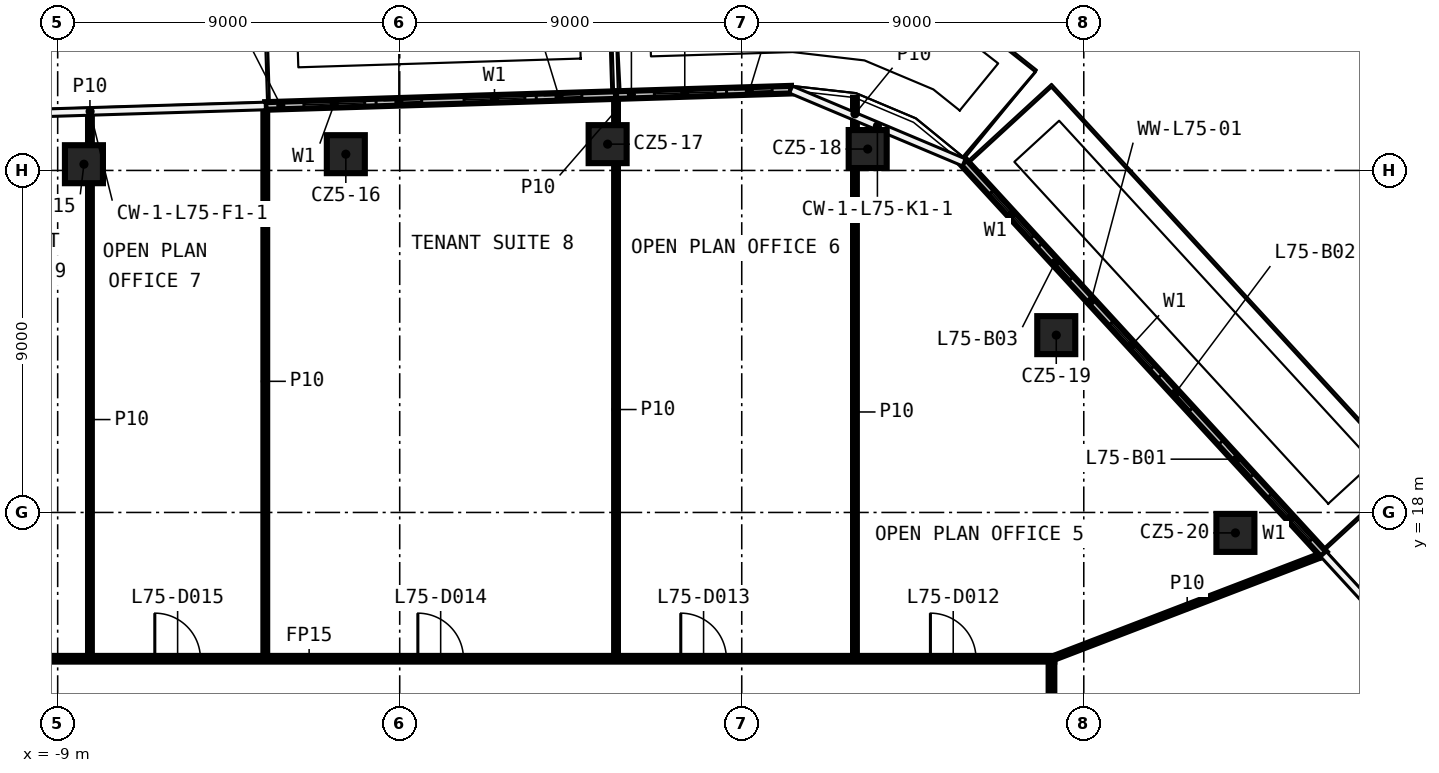
"""IFC4 building model, lengths in metres.
Left out: names, types, materials, properties, quantities, classifications, styles, units other than length and angle.
Written with IfcOpenShell. Run it as: python <this file> out.ifc"""

import sys

from ifc_helpers import new_model, si_unit, direction, frame, frame_2d, origin, origin_2d, place, context, subcontext, project, spatial, rectangle, extrude, element, fill, save


model = new_model("IFC4")
c1 = context("Model", 3, precision=1e-05, world=origin(), true_north=direction((0.0, 1.0)))
c2 = subcontext(c1, "Body", "Model", "MODEL_VIEW")
j1 = project(units=[si_unit("LENGTHUNIT", "METRE"), si_unit("PLANEANGLEUNIT", "RADIAN")], contexts=[c1])
p1 = place(None, origin())
s1 = spatial("IfcSite", under=j1, at=p1, CompositionType="ELEMENT")
p2 = place(p1, origin())
s2 = spatial("IfcBuilding", under=s1, at=p2, CompositionType="ELEMENT")
p3 = place(p2, frame((0.0, 0.0, 348.8)))
s3 = spatial("IfcBuildingStorey", under=s2, at=p3, CompositionType="ELEMENT", Elevation=348.8)
for number, where, z_axis, x_axis in (
    (1, (-8.309, 27.164, 0.0), (0.0, 0.0, 1.0), (1.0, 0.0, 0.0)),
    (2, (-1.418, 27.428, 0.0), (0.0, 0.0, 1.0), (1.0, 0.0, 0.0)),
    (3, (5.471, 27.692, 0.0), (0.0, 0.0, 1.0), (1.0, 0.0, 0.0)),
    (4, (12.314, 27.563, 0.0), (0.0, 0.0, 1.0), (1.0, 0.0, 0.0)),
    (5, (17.276, 22.666, 0.0), (0.0, 0.0, 1.0), (1.0, 0.0, 0.0)),
    (6, (21.99, 17.462, 0.0), (0.0, 0.0, 1.0), (1.0, 0.0, 0.0)),
):
    element("IfcColumn", number, at=place(p3, frame(where, z_axis=z_axis, x_axis=x_axis)), inside=s3, PredefinedType="COLUMN", context=c2, shape_type="SweptSolid", body=[
        extrude(rectangle(XDim=1.0, YDim=1.0, at=origin_2d()), origin(), (0.0, 0.0, 1.0), 3.7),
    ])
p4 = place(p3, frame((-17.225, 14.15, 0.0), z_axis=(0.0, 0.0, 1.0), x_axis=(1.0, 0.0, 0.0)))
e7 = element("IfcWall", 7, at=p4, inside=s3, PredefinedType="PARTITIONING", context=c2, shape_type="SweptSolid", body=[
    extrude(rectangle(XDim=34.45, YDim=0.15, at=frame_2d((17.225, 0.0))), origin(), (0.0, 0.0, 1.0), 3.7),
])
p5 = place(p4, frame((31.19, 0.0, 0.0)))
e8 = element("IfcOpeningElement", 8, at=p5, cuts=e7, PredefinedType="OPENING", context=c2, shape_type="SweptSolid", body=[
    extrude(rectangle(XDim=1.2, YDim=2.1, at=frame_2d((0.6, 1.05))), frame((0.0, 0.085, 0.0), z_axis=(0.0, -1.0, 0.0), x_axis=(1.0, 0.0, 0.0)), (0.0, 0.0, 1.0), 0.17),
])
p6 = place(p4, frame((24.621, 0.0, 0.0)))
e9 = element("IfcOpeningElement", 9, at=p6, cuts=e7, PredefinedType="OPENING", context=c2, shape_type="SweptSolid", body=[
    extrude(rectangle(XDim=1.2, YDim=2.1, at=frame_2d((0.6, 1.05))), frame((0.0, 0.085, 0.0), z_axis=(0.0, -1.0, 0.0), x_axis=(1.0, 0.0, 0.0)), (0.0, 0.0, 1.0), 0.17),
])
p7 = place(p4, frame((17.703, 0.0, 0.0)))
e10 = element("IfcOpeningElement", 10, at=p7, cuts=e7, PredefinedType="OPENING", context=c2, shape_type="SweptSolid", body=[
    extrude(rectangle(XDim=1.2, YDim=2.1, at=frame_2d((0.6, 1.05))), frame((0.0, 0.085, 0.0), z_axis=(0.0, -1.0, 0.0), x_axis=(1.0, 0.0, 0.0)), (0.0, 0.0, 1.0), 0.17),
])
p8 = place(p4, frame((10.781, 0.0, 0.0)))
e11 = element("IfcOpeningElement", 11, at=p8, cuts=e7, PredefinedType="OPENING", context=c2, shape_type="SweptSolid", body=[
    extrude(rectangle(XDim=1.2, YDim=2.1, at=frame_2d((0.6, 1.05))), frame((0.0, 0.085, 0.0), z_axis=(0.0, -1.0, 0.0), x_axis=(1.0, 0.0, 0.0)), (0.0, 0.0, 1.0), 0.17),
])
p9 = place(p4, frame((6.171, 0.0, 0.0)))
e12 = element("IfcOpeningElement", 12, at=p9, cuts=e7, PredefinedType="OPENING", context=c2, shape_type="SweptSolid", body=[
    extrude(rectangle(XDim=1.2, YDim=2.1, at=frame_2d((0.6, 1.05))), frame((0.0, 0.085, 0.0), z_axis=(0.0, -1.0, 0.0), x_axis=(1.0, 0.0, 0.0)), (0.0, 0.0, 1.0), 0.17),
])
p10 = place(p4, frame((1.932, 0.0, 0.0)))
e13 = element("IfcOpeningElement", 13, at=p10, cuts=e7, PredefinedType="OPENING", context=c2, shape_type="SweptSolid", body=[
    extrude(rectangle(XDim=1.2, YDim=2.1, at=frame_2d((0.6, 1.05))), frame((0.0, 0.085, 0.0), z_axis=(0.0, -1.0, 0.0), x_axis=(1.0, 0.0, 0.0)), (0.0, 0.0, 1.0), 0.17),
])
p11 = place(p3, frame((17.15, 14.15, 0.0), z_axis=(0.0, 0.0, 1.0), x_axis=(0.933641376905, 0.358209127927, 0.0)))
e14 = element("IfcWall", 14, at=p11, inside=s3, PredefinedType="PARTITIONING", context=c2, shape_type="SweptSolid", body=[
    extrude(rectangle(XDim=7.65, YDim=0.1, at=frame_2d((3.825, 0.0))), origin(), (0.0, 0.0, 1.0), 3.7),
])
p12 = place(p3, frame((17.15, 14.075, 0.0), z_axis=(0.0, 0.0, 1.0), x_axis=(0.0, -1.0, 0.0)))
e15 = element("IfcWall", 15, at=p12, inside=s3, PredefinedType="PARTITIONING", context=c2, shape_type="SweptSolid", body=[
    extrude(rectangle(XDim=28.15, YDim=0.15, at=frame_2d((14.075, 0.0))), origin(), (0.0, 0.0, 1.0), 3.7),
])
p13 = place(p12, frame((24.292, 0.0, 0.0)))
e16 = element("IfcOpeningElement", 16, at=p13, cuts=e15, PredefinedType="OPENING", context=c2, shape_type="SweptSolid", body=[
    extrude(rectangle(XDim=1.2, YDim=2.1, at=frame_2d((0.6, 1.05))), frame((0.0, 0.085, 0.0), z_axis=(0.0, -1.0, 0.0), x_axis=(1.0, 0.0, 0.0)), (0.0, 0.0, 1.0), 0.17),
])
p14 = place(p12, frame((10.898, 0.0, 0.0)))
e17 = element("IfcOpeningElement", 17, at=p14, cuts=e15, PredefinedType="OPENING", context=c2, shape_type="SweptSolid", body=[
    extrude(rectangle(XDim=1.2, YDim=2.1, at=frame_2d((0.6, 1.05))), frame((0.0, 0.085, 0.0), z_axis=(0.0, -1.0, 0.0), x_axis=(1.0, 0.0, 0.0)), (0.0, 0.0, 1.0), 0.17),
])
p15 = place(p12, frame((3.873, 0.0, 0.0)))
e18 = element("IfcOpeningElement", 18, at=p15, cuts=e15, PredefinedType="OPENING", context=c2, shape_type="SweptSolid", body=[
    extrude(rectangle(XDim=1.2, YDim=2.1, at=frame_2d((0.6, 1.05))), frame((0.0, 0.085, 0.0), z_axis=(0.0, -1.0, 0.0), x_axis=(1.0, 0.0, 0.0)), (0.0, 0.0, 1.0), 0.17),
])
p16 = place(p3, frame((11.979, 14.225, 0.0), z_axis=(0.0, 0.0, 1.0), x_axis=(0.0, 1.0, 0.0)))
e19 = element("IfcWall", 19, at=p16, inside=s3, PredefinedType="PARTITIONING", context=c2, shape_type="SweptSolid", body=[
    extrude(rectangle(XDim=12.838, YDim=0.1, at=frame_2d((6.419, 0.0))), origin(), (0.0, 0.0, 1.0), 3.7),
])
p17 = place(p3, frame((11.979, 28.063, 0.0), z_axis=(0.0, 0.0, 1.0), x_axis=(0.0, 1.0, 0.0)))
e20 = element("IfcWall", 20, at=p17, inside=s3, PredefinedType="PARTITIONING", context=c2, shape_type="SweptSolid", body=[
    extrude(rectangle(XDim=0.852, YDim=0.1, at=frame_2d((0.426, 0.0))), origin(), (0.0, 0.0, 1.0), 3.7),
])
p18 = place(p3, frame((5.692, 14.225, 0.0), z_axis=(0.0, 0.0, 1.0), x_axis=(0.0, 1.0, 0.0)))
e21 = element("IfcWall", 21, at=p18, inside=s3, PredefinedType="PARTITIONING", context=c2, shape_type="SweptSolid", body=[
    extrude(rectangle(XDim=12.967, YDim=0.1, at=frame_2d((6.483, 0.0))), origin(), (0.0, 0.0, 1.0), 3.7),
])
p19 = place(p3, frame((5.692, 28.192, 0.0), z_axis=(0.0, 0.0, 1.0), x_axis=(0.0, 1.0, 0.0)))
e22 = element("IfcWall", 22, at=p19, inside=s3, PredefinedType="PARTITIONING", context=c2, shape_type="SweptSolid", body=[
    extrude(rectangle(XDim=0.771, YDim=0.1, at=frame_2d((0.385, 0.0))), origin(), (0.0, 0.0, 1.0), 3.7),
])
p20 = place(p3, frame((-3.537, 14.225, 0.0), z_axis=(0.0, 0.0, 1.0), x_axis=(0.0, 1.0, 0.0)))
e23 = element("IfcWall", 23, at=p20, inside=s3, PredefinedType="PARTITIONING", context=c2, shape_type="SweptSolid", body=[
    extrude(rectangle(XDim=14.451, YDim=0.1, at=frame_2d((7.226, 0.0))), origin(), (0.0, 0.0, 1.0), 3.7),
])
p21 = place(p3, frame((-8.151, 14.225, 0.0), z_axis=(0.0, 0.0, 1.0), x_axis=(0.0, 1.0, 0.0)))
e24 = element("IfcWall", 24, at=p21, inside=s3, PredefinedType="PARTITIONING", context=c2, shape_type="SweptSolid", body=[
    extrude(rectangle(XDim=12.439, YDim=0.1, at=frame_2d((6.219, 0.0))), origin(), (0.0, 0.0, 1.0), 3.7),
])
p22 = place(p3, frame((-8.151, 27.664, 0.0), z_axis=(0.0, 0.0, 1.0), x_axis=(0.0, 1.0, 0.0)))
e25 = element("IfcWall", 25, at=p22, inside=s3, PredefinedType="PARTITIONING", context=c2, shape_type="SweptSolid", body=[
    extrude(rectangle(XDim=0.869, YDim=0.1, at=frame_2d((0.435, 0.0))), origin(), (0.0, 0.0, 1.0), 3.7),
])
p23 = place(p3, frame((24.313, 16.898, 0.0), z_axis=(0.0, 0.0, 1.0), x_axis=(-0.676360611012, 0.736570650971, 0.0)))
e26 = element("IfcWall", 26, at=p23, inside=s3, PredefinedType="SOLIDWALL", context=c2, shape_type="SweptSolid", body=[
    extrude(rectangle(XDim=14.005, YDim=0.2, at=frame_2d((7.003, 0.0))), origin(), (0.0, 0.0, 1.0), 3.7),
])
p24 = place(p23, frame((0.5, 0.0, 0.6)))
e27 = element("IfcOpeningElement", 27, at=p24, cuts=e26, PredefinedType="OPENING", context=c2, shape_type="SweptSolid", body=[
    extrude(rectangle(XDim=1.6, YDim=2.4, at=frame_2d((0.8, 1.2))), frame((0.0, 0.11, 0.0), z_axis=(0.0, -1.0, 0.0), x_axis=(1.0, 0.0, 0.0)), (0.0, 0.0, 1.0), 0.22),
])
p25 = place(p23, frame((2.8, 0.0, 0.0)))
e28 = element("IfcOpeningElement", 28, at=p25, cuts=e26, PredefinedType="OPENING", context=c2, shape_type="SweptSolid", body=[
    extrude(rectangle(XDim=1.2, YDim=2.4, at=frame_2d((0.6, 1.2))), frame((0.0, 0.11, 0.0), z_axis=(0.0, -1.0, 0.0), x_axis=(1.0, 0.0, 0.0)), (0.0, 0.0, 1.0), 0.22),
])
p26 = place(p23, frame((6.668, 0.0, 0.6)))
e29 = element("IfcOpeningElement", 29, at=p26, cuts=e26, PredefinedType="OPENING", context=c2, shape_type="SweptSolid", body=[
    extrude(rectangle(XDim=1.6, YDim=2.4, at=frame_2d((0.8, 1.2))), frame((0.0, 0.11, 0.0), z_axis=(0.0, -1.0, 0.0), x_axis=(1.0, 0.0, 0.0)), (0.0, 0.0, 1.0), 0.22),
])
p27 = place(p23, frame((5.168, 0.0, 0.0)))
e30 = element("IfcOpeningElement", 30, at=p27, cuts=e26, PredefinedType="OPENING", context=c2, shape_type="SweptSolid", body=[
    extrude(rectangle(XDim=1.2, YDim=2.4, at=frame_2d((0.6, 1.2))), frame((0.0, 0.11, 0.0), z_axis=(0.0, -1.0, 0.0), x_axis=(1.0, 0.0, 0.0)), (0.0, 0.0, 1.0), 0.22),
])
p28 = place(p23, frame((11.337, 0.0, 0.6)))
e31 = element("IfcOpeningElement", 31, at=p28, cuts=e26, PredefinedType="OPENING", context=c2, shape_type="SweptSolid", body=[
    extrude(rectangle(XDim=1.6, YDim=2.4, at=frame_2d((0.8, 1.2))), frame((0.0, 0.11, 0.0), z_axis=(0.0, -1.0, 0.0), x_axis=(1.0, 0.0, 0.0)), (0.0, 0.0, 1.0), 0.22),
])
p29 = place(p23, frame((9.837, 0.0, 0.0)))
e32 = element("IfcOpeningElement", 32, at=p29, cuts=e26, PredefinedType="OPENING", context=c2, shape_type="SweptSolid", body=[
    extrude(rectangle(XDim=1.2, YDim=2.4, at=frame_2d((0.6, 1.2))), frame((0.0, 0.11, 0.0), z_axis=(0.0, -1.0, 0.0), x_axis=(1.0, 0.0, 0.0)), (0.0, 0.0, 1.0), 0.22),
])
p30 = place(p3, frame((5.692, 28.983, 0.0), z_axis=(0.0, 0.0, 1.0), x_axis=(-0.999518913705, -0.031015176069, 0.0)))
e33 = element("IfcWall", 33, at=p30, inside=s3, PredefinedType="SOLIDWALL", context=c2, shape_type="SweptSolid", body=[
    extrude(rectangle(XDim=9.233, YDim=0.2, at=frame_2d((4.617, 0.0))), origin(), (0.0, 0.0, 1.0), 3.7),
])
p31 = place(p30, frame((2.4, 0.0, 0.6)))
e34 = element("IfcOpeningElement", 34, at=p31, cuts=e33, PredefinedType="OPENING", context=c2, shape_type="SweptSolid", body=[
    extrude(rectangle(XDim=1.6, YDim=2.4, at=frame_2d((0.8, 1.2))), frame((0.0, 0.11, 0.0), z_axis=(0.0, -1.0, 0.0), x_axis=(1.0, 0.0, 0.0)), (0.0, 0.0, 1.0), 0.22),
])
p32 = place(p30, frame((0.9, 0.0, 0.0)))
e35 = element("IfcOpeningElement", 35, at=p32, cuts=e33, PredefinedType="OPENING", context=c2, shape_type="SweptSolid", body=[
    extrude(rectangle(XDim=1.2, YDim=2.4, at=frame_2d((0.6, 1.2))), frame((0.0, 0.11, 0.0), z_axis=(0.0, -1.0, 0.0), x_axis=(1.0, 0.0, 0.0)), (0.0, 0.0, 1.0), 0.22),
])
p33 = place(p30, frame((6.617, 0.0, 0.6)))
e36 = element("IfcOpeningElement", 36, at=p33, cuts=e33, PredefinedType="OPENING", context=c2, shape_type="SweptSolid", body=[
    extrude(rectangle(XDim=1.6, YDim=2.4, at=frame_2d((0.8, 1.2))), frame((0.0, 0.11, 0.0), z_axis=(0.0, -1.0, 0.0), x_axis=(1.0, 0.0, 0.0)), (0.0, 0.0, 1.0), 0.22),
])
p34 = place(p30, frame((5.117, 0.0, 0.0)))
e37 = element("IfcOpeningElement", 37, at=p34, cuts=e33, PredefinedType="OPENING", context=c2, shape_type="SweptSolid", body=[
    extrude(rectangle(XDim=1.2, YDim=2.4, at=frame_2d((0.6, 1.2))), frame((0.0, 0.11, 0.0), z_axis=(0.0, -1.0, 0.0), x_axis=(1.0, 0.0, 0.0)), (0.0, 0.0, 1.0), 0.22),
])
p35 = place(p3, frame((10.299, 29.126, 0.0), z_axis=(0.0, 0.0, 1.0), x_axis=(-0.999519847684, -0.030985062312, 0.0)))
e38 = element("IfcWall", 38, at=p35, inside=s3, PredefinedType="SOLIDWALL", context=c2, shape_type="SweptSolid", body=[
    extrude(rectangle(XDim=4.609, YDim=0.2, at=frame_2d((2.305, 0.0))), origin(), (0.0, 0.0, 1.0), 3.7),
])
p36 = place(p35, frame((2.0, 0.0, 0.6)))
e39 = element("IfcOpeningElement", 39, at=p36, cuts=e38, PredefinedType="OPENING", context=c2, shape_type="SweptSolid", body=[
    extrude(rectangle(XDim=1.6, YDim=2.4, at=frame_2d((0.8, 1.2))), frame((0.0, 0.11, 0.0), z_axis=(0.0, -1.0, 0.0), x_axis=(1.0, 0.0, 0.0)), (0.0, 0.0, 1.0), 0.22),
])
p37 = place(p35, frame((0.5, 0.0, 0.0)))
e40 = element("IfcOpeningElement", 40, at=p37, cuts=e38, PredefinedType="OPENING", context=c2, shape_type="SweptSolid", body=[
    extrude(rectangle(XDim=1.2, YDim=2.4, at=frame_2d((0.6, 1.2))), frame((0.0, 0.11, 0.0), z_axis=(0.0, -1.0, 0.0), x_axis=(1.0, 0.0, 0.0)), (0.0, 0.0, 1.0), 0.22),
])
p38 = place(p5, origin())
e41 = element("IfcDoor", 41, at=p38, inside=s3, OperationType="SINGLE_SWING_LEFT", PredefinedType="DOOR", context=c2, shape_type="SweptSolid", body=[
    extrude(rectangle(XDim=1.2, YDim=2.1, at=frame_2d((0.6, 1.05))), frame((0.0, 0.025, 0.0), z_axis=(0.0, -1.0, 0.0), x_axis=(1.0, 0.0, 0.0)), (0.0, 0.0, 1.0), 0.05),
])
fill(e8, e41)
p39 = place(p6, origin())
e42 = element("IfcDoor", 42, at=p39, inside=s3, OperationType="SINGLE_SWING_RIGHT", PredefinedType="DOOR", context=c2, shape_type="SweptSolid", body=[
    extrude(rectangle(XDim=1.2, YDim=2.1, at=frame_2d((0.6, 1.05))), frame((0.0, 0.025, 0.0), z_axis=(0.0, -1.0, 0.0), x_axis=(1.0, 0.0, 0.0)), (0.0, 0.0, 1.0), 0.05),
])
fill(e9, e42)
p40 = place(p7, origin())
e43 = element("IfcDoor", 43, at=p40, inside=s3, OperationType="SINGLE_SWING_LEFT", PredefinedType="DOOR", context=c2, shape_type="SweptSolid", body=[
    extrude(rectangle(XDim=1.2, YDim=2.1, at=frame_2d((0.6, 1.05))), frame((0.0, 0.025, 0.0), z_axis=(0.0, -1.0, 0.0), x_axis=(1.0, 0.0, 0.0)), (0.0, 0.0, 1.0), 0.05),
])
fill(e10, e43)
p41 = place(p8, origin())
e44 = element("IfcDoor", 44, at=p41, inside=s3, OperationType="SINGLE_SWING_RIGHT", PredefinedType="DOOR", context=c2, shape_type="SweptSolid", body=[
    extrude(rectangle(XDim=1.2, YDim=2.1, at=frame_2d((0.6, 1.05))), frame((0.0, 0.025, 0.0), z_axis=(0.0, -1.0, 0.0), x_axis=(1.0, 0.0, 0.0)), (0.0, 0.0, 1.0), 0.05),
])
fill(e11, e44)
p42 = place(p24, origin())
e45 = element("IfcWindow", 45, at=p42, inside=s3, PartitioningType="SINGLE_PANEL", PredefinedType="WINDOW", context=c2, shape_type="SweptSolid", body=[
    extrude(rectangle(XDim=1.6, YDim=2.4, at=frame_2d((0.8, 1.2))), frame((0.0, 0.03, 0.0), z_axis=(0.0, -1.0, 0.0), x_axis=(1.0, 0.0, 0.0)), (0.0, 0.0, 1.0), 0.06),
])
fill(e27, e45)
p43 = place(p25, origin())
e46 = element("IfcDoor", 46, at=p43, inside=s3, OperationType="SLIDING_TO_LEFT", PredefinedType="DOOR", context=c2, shape_type="SweptSolid", body=[
    extrude(rectangle(XDim=1.2, YDim=2.4, at=frame_2d((0.6, 1.2))), frame((0.0, 0.025, 0.0), z_axis=(0.0, -1.0, 0.0), x_axis=(1.0, 0.0, 0.0)), (0.0, 0.0, 1.0), 0.05),
])
fill(e28, e46)
p44 = place(p26, origin())
e47 = element("IfcWindow", 47, at=p44, inside=s3, PartitioningType="SINGLE_PANEL", PredefinedType="WINDOW", context=c2, shape_type="SweptSolid", body=[
    extrude(rectangle(XDim=1.6, YDim=2.4, at=frame_2d((0.8, 1.2))), frame((0.0, 0.03, 0.0), z_axis=(0.0, -1.0, 0.0), x_axis=(1.0, 0.0, 0.0)), (0.0, 0.0, 1.0), 0.06),
])
fill(e29, e47)
p45 = place(p27, origin())
e48 = element("IfcDoor", 48, at=p45, inside=s3, OperationType="SLIDING_TO_LEFT", PredefinedType="DOOR", context=c2, shape_type="SweptSolid", body=[
    extrude(rectangle(XDim=1.2, YDim=2.4, at=frame_2d((0.6, 1.2))), frame((0.0, 0.025, 0.0), z_axis=(0.0, -1.0, 0.0), x_axis=(1.0, 0.0, 0.0)), (0.0, 0.0, 1.0), 0.05),
])
fill(e30, e48)
p46 = place(p28, origin())
e49 = element("IfcWindow", 49, at=p46, inside=s3, PartitioningType="SINGLE_PANEL", PredefinedType="WINDOW", context=c2, shape_type="SweptSolid", body=[
    extrude(rectangle(XDim=1.6, YDim=2.4, at=frame_2d((0.8, 1.2))), frame((0.0, 0.03, 0.0), z_axis=(0.0, -1.0, 0.0), x_axis=(1.0, 0.0, 0.0)), (0.0, 0.0, 1.0), 0.06),
])
fill(e31, e49)
p47 = place(p29, origin())
e50 = element("IfcDoor", 50, at=p47, inside=s3, OperationType="SLIDING_TO_LEFT", PredefinedType="DOOR", context=c2, shape_type="SweptSolid", body=[
    extrude(rectangle(XDim=1.2, YDim=2.4, at=frame_2d((0.6, 1.2))), frame((0.0, 0.025, 0.0), z_axis=(0.0, -1.0, 0.0), x_axis=(1.0, 0.0, 0.0)), (0.0, 0.0, 1.0), 0.05),
])
fill(e32, e50)
p48 = place(p31, origin())
e51 = element("IfcWindow", 51, at=p48, inside=s3, PartitioningType="SINGLE_PANEL", PredefinedType="WINDOW", context=c2, shape_type="SweptSolid", body=[
    extrude(rectangle(XDim=1.6, YDim=2.4, at=frame_2d((0.8, 1.2))), frame((0.0, 0.03, 0.0), z_axis=(0.0, -1.0, 0.0), x_axis=(1.0, 0.0, 0.0)), (0.0, 0.0, 1.0), 0.06),
])
fill(e34, e51)
p49 = place(p32, origin())
e52 = element("IfcDoor", 52, at=p49, inside=s3, OperationType="SLIDING_TO_LEFT", PredefinedType="DOOR", context=c2, shape_type="SweptSolid", body=[
    extrude(rectangle(XDim=1.2, YDim=2.4, at=frame_2d((0.6, 1.2))), frame((0.0, 0.025, 0.0), z_axis=(0.0, -1.0, 0.0), x_axis=(1.0, 0.0, 0.0)), (0.0, 0.0, 1.0), 0.05),
])
fill(e35, e52)
p50 = place(p33, origin())
e53 = element("IfcWindow", 53, at=p50, inside=s3, PartitioningType="SINGLE_PANEL", PredefinedType="WINDOW", context=c2, shape_type="SweptSolid", body=[
    extrude(rectangle(XDim=1.6, YDim=2.4, at=frame_2d((0.8, 1.2))), frame((0.0, 0.03, 0.0), z_axis=(0.0, -1.0, 0.0), x_axis=(1.0, 0.0, 0.0)), (0.0, 0.0, 1.0), 0.06),
])
fill(e36, e53)
p51 = place(p34, origin())
e54 = element("IfcDoor", 54, at=p51, inside=s3, OperationType="SLIDING_TO_LEFT", PredefinedType="DOOR", context=c2, shape_type="SweptSolid", body=[
    extrude(rectangle(XDim=1.2, YDim=2.4, at=frame_2d((0.6, 1.2))), frame((0.0, 0.025, 0.0), z_axis=(0.0, -1.0, 0.0), x_axis=(1.0, 0.0, 0.0)), (0.0, 0.0, 1.0), 0.05),
])
fill(e37, e54)
p52 = place(p36, origin())
e55 = element("IfcWindow", 55, at=p52, inside=s3, PartitioningType="SINGLE_PANEL", PredefinedType="WINDOW", context=c2, shape_type="SweptSolid", body=[
    extrude(rectangle(XDim=1.6, YDim=2.4, at=frame_2d((0.8, 1.2))), frame((0.0, 0.03, 0.0), z_axis=(0.0, -1.0, 0.0), x_axis=(1.0, 0.0, 0.0)), (0.0, 0.0, 1.0), 0.06),
])
fill(e39, e55)
p53 = place(p37, origin())
e56 = element("IfcDoor", 56, at=p53, inside=s3, OperationType="SLIDING_TO_LEFT", PredefinedType="DOOR", context=c2, shape_type="SweptSolid", body=[
    extrude(rectangle(XDim=1.2, YDim=2.4, at=frame_2d((0.6, 1.2))), frame((0.0, 0.025, 0.0), z_axis=(0.0, -1.0, 0.0), x_axis=(1.0, 0.0, 0.0)), (0.0, 0.0, 1.0), 0.05),
])
fill(e40, e56)
save(model, sys.argv[1])
